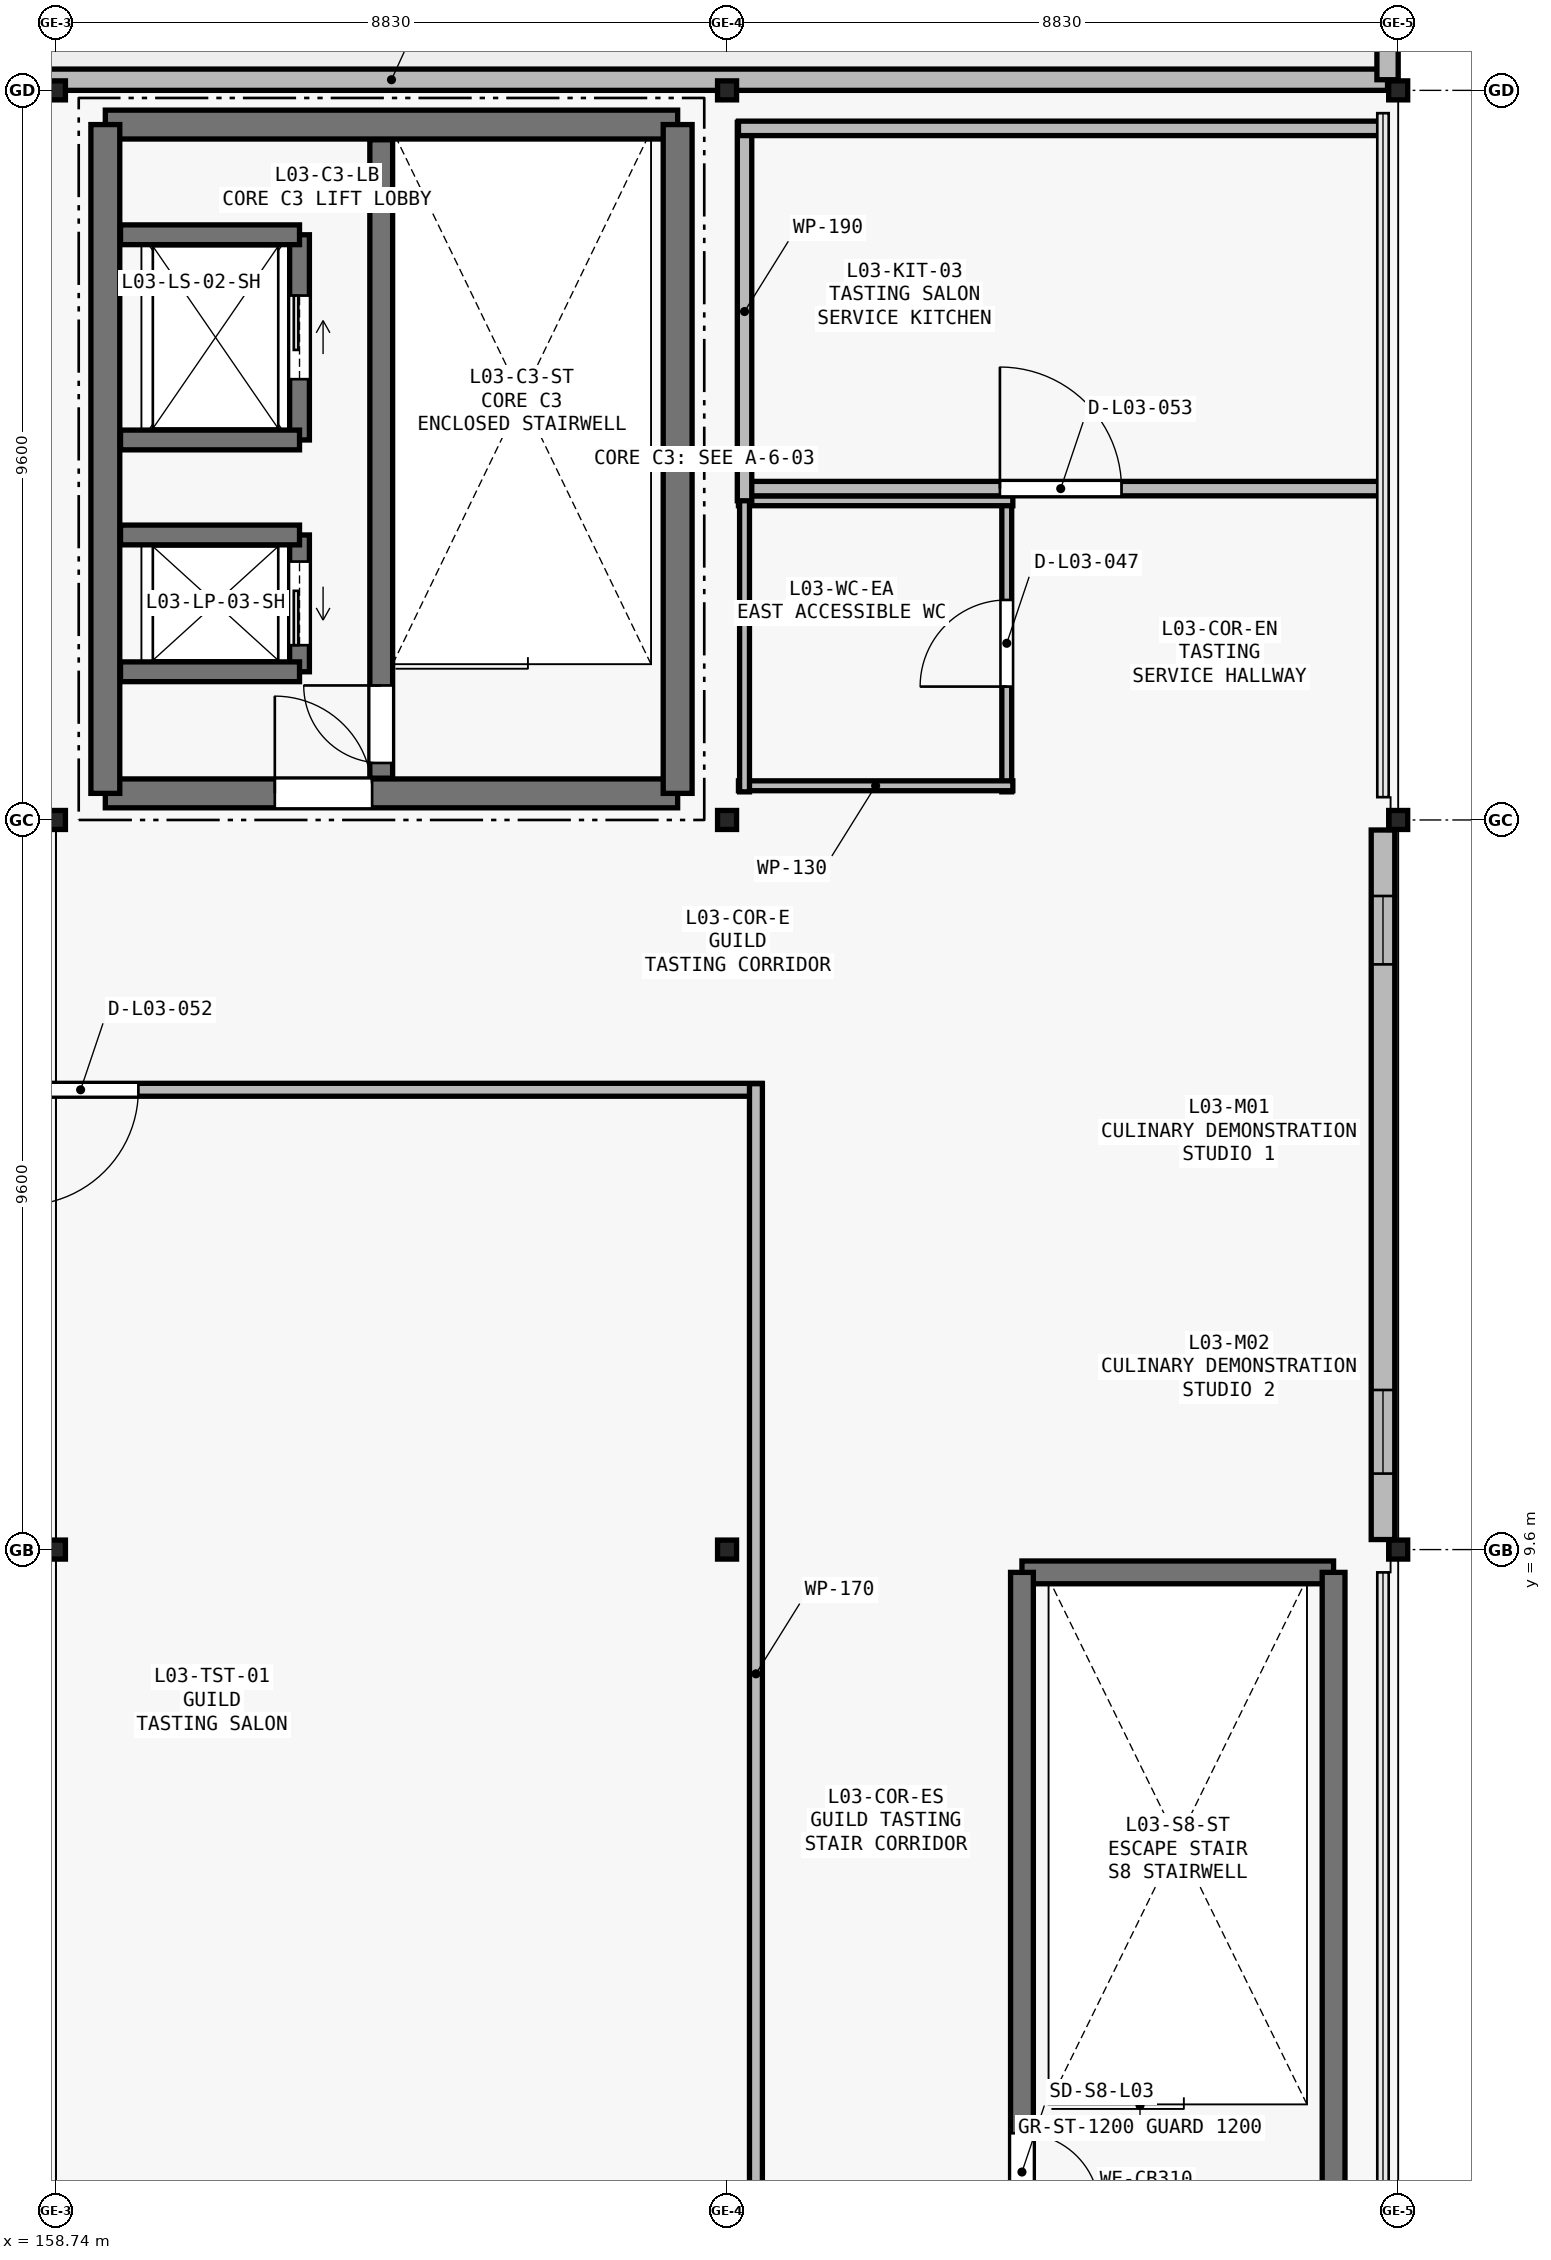
"""IFC4 building model, lengths in metres.
Left out: names, types, materials, properties, quantities, classifications, styles, units other than length and angle.
Written with IfcOpenShell. Run it as: python <this file> out.ifc"""

import sys

from ifc_helpers import new_model, si_unit, direction, frame, frame_2d, origin, origin_2d, place, context, subcontext, project, spatial, rectangle, i_section, extrude, element, fill, save


model = new_model("IFC4")
c1 = context("Model", 3, precision=1e-05, world=origin(), true_north=direction((0.0, 1.0)))
c2 = subcontext(c1, "Body", "Model", "MODEL_VIEW")
j1 = project(units=[si_unit("LENGTHUNIT", "METRE"), si_unit("PLANEANGLEUNIT", "RADIAN")], contexts=[c1])
p1 = place(None, origin())
s1 = spatial("IfcSite", under=j1, at=p1, CompositionType="ELEMENT")
p2 = place(p1, origin())
s2 = spatial("IfcBuilding", under=s1, at=p2, CompositionType="ELEMENT")
p3 = place(p2, frame((0.0, 0.0, 15.0)))
s3 = spatial("IfcBuildingStorey", under=s2, at=p3, CompositionType="ELEMENT", Elevation=15.0)
for number, where, z_axis, x_axis in (
    (1, (158.74, 9.6, 0.0), (0.0, 0.0, 1.0), (1.0, 0.0, 0.0)),
    (2, (158.74, 19.2, 0.0), (0.0, 0.0, 1.0), (1.0, 0.0, 0.0)),
    (3, (158.74, 28.8, 0.0), (0.0, 0.0, 1.0), (1.0, 0.0, 0.0)),
    (4, (167.57, 9.6, 0.0), (0.0, 0.0, 1.0), (1.0, 0.0, 0.0)),
    (5, (167.57, 19.2, 0.0), (0.0, 0.0, 1.0), (1.0, 0.0, 0.0)),
    (6, (167.57, 28.8, 0.0), (0.0, 0.0, 1.0), (1.0, 0.0, 0.0)),
    (7, (176.4, 9.6, 0.0), (0.0, 0.0, 1.0), (1.0, 0.0, 0.0)),
    (8, (176.4, 19.2, 0.0), (0.0, 0.0, 1.0), (1.0, 0.0, 0.0)),
    (9, (176.4, 28.8, 0.0), (0.0, 0.0, 1.0), (1.0, 0.0, 0.0)),
):
    element("IfcColumn", number, at=place(p3, frame(where, z_axis=z_axis, x_axis=x_axis)), inside=s3, PredefinedType="COLUMN", context=c2, shape_type="SweptSolid", body=[
        extrude(i_section(OverallWidth=0.25, OverallDepth=0.25, WebThickness=0.009, FlangeThickness=0.014, FilletRadius=0.016, at=origin_2d()), origin(), (0.0, 0.0, 1.0), 4.2),
    ])
p4 = place(p3, frame((176.2, 19.068, 0.0), z_axis=(0.0, 0.0, 1.0), x_axis=(0.0, -1.0, 0.0)))
e10 = element("IfcWall", 10, at=p4, inside=s3, PredefinedType="SOLIDWALL", context=c2, shape_type="SweptSolid", body=[
    extrude(rectangle(XDim=9.336, YDim=0.31, at=frame_2d((4.668, 0.0))), origin(), (0.0, 0.0, 1.0), 3.35),
])
p5 = place(p4, frame((0.868, 0.0, 0.95)))
e11 = element("IfcOpeningElement", 11, at=p5, cuts=e10, PredefinedType="OPENING", context=c2, shape_type="SweptSolid", body=[
    extrude(rectangle(XDim=0.9, YDim=2.1, at=frame_2d((0.45, 1.05))), frame((0.0, 0.165, 0.0), z_axis=(0.0, -1.0, 0.0), x_axis=(1.0, 0.0, 0.0)), (0.0, 0.0, 1.0), 0.33),
])
p6 = place(p4, frame((7.368, 0.0, 0.95)))
e12 = element("IfcOpeningElement", 12, at=p6, cuts=e10, PredefinedType="OPENING", context=c2, shape_type="SweptSolid", body=[
    extrude(rectangle(XDim=1.1, YDim=2.1, at=frame_2d((0.55, 1.05))), frame((0.0, 0.165, 0.0), z_axis=(0.0, -1.0, 0.0), x_axis=(1.0, 0.0, 0.0)), (0.0, 0.0, 1.0), 0.33),
])
p7 = place(p3, frame((150.05, 28.94, 0.01), z_axis=(0.0, 0.0, 1.0), x_axis=(1.0, 0.0, 0.0)))
e13 = element("IfcWall", 13, at=p7, inside=s3, PredefinedType="PARAPET", context=c2, shape_type="SweptSolid", body=[
    extrude(rectangle(XDim=26.21, YDim=0.28, at=frame_2d((13.105, 0.0))), origin(), (0.0, 0.0, 1.0), 1.15),
])
p8 = place(p3, frame((176.26, 28.94, 0.01), z_axis=(0.0, 0.0, 1.0), x_axis=(0.0, 1.0, 0.0)))
e14 = element("IfcWall", 14, at=p8, inside=s3, PredefinedType="PARAPET", context=c2, shape_type="SweptSolid", body=[
    extrude(rectangle(XDim=6.92, YDim=0.28, at=frame_2d((3.46, 0.0))), origin(), (0.0, 0.0, 1.0), 1.15),
])
p9 = place(p3, frame((159.39, 19.55, 0.0), z_axis=(0.0, 0.0, 1.0), x_axis=(1.0, 0.0, 0.0)))
e15 = element("IfcWall", 15, at=p9, inside=s3, PredefinedType="SHEAR", context=c2, shape_type="SweptSolid", body=[
    extrude(rectangle(XDim=7.53, YDim=0.38, at=frame_2d((3.765, 0.0))), origin(), (0.0, 0.0, 1.0), 4.2),
])
p10 = place(p9, frame((2.23, 0.0, 0.0)))
e16 = element("IfcOpeningElement", 16, at=p10, cuts=e15, PredefinedType="OPENING", context=c2, shape_type="SweptSolid", body=[
    extrude(rectangle(XDim=1.28, YDim=2.15, at=frame_2d((0.64, 1.075))), frame((0.0, 0.2, 0.0), z_axis=(0.0, -1.0, 0.0), x_axis=(1.0, 0.0, 0.0)), (0.0, 0.0, 1.0), 0.4),
])
p11 = place(p3, frame((166.92, 28.35, 0.0), z_axis=(0.0, 0.0, 1.0), x_axis=(-1.0, 0.0, 0.0)))
e17 = element("IfcWall", 17, at=p11, inside=s3, PredefinedType="SHEAR", context=c2, shape_type="SweptSolid", body=[
    extrude(rectangle(XDim=7.53, YDim=0.38, at=frame_2d((3.765, 0.0))), origin(), (0.0, 0.0, 1.0), 4.2),
])
for number, where, z_axis, x_axis in (
    (18, (159.39, 28.35, 0.0), (0.0, 0.0, 1.0), (0.0, -1.0, 0.0)),
    (19, (166.92, 19.55, 0.0), (0.0, 0.0, 1.0), (0.0, 1.0, 0.0)),
):
    element("IfcWall", number, at=place(p3, frame(where, z_axis=z_axis, x_axis=x_axis)), inside=s3, PredefinedType="SHEAR", context=c2, shape_type="SweptSolid", body=[
        extrude(rectangle(XDim=8.8, YDim=0.38, at=frame_2d((4.4, 0.0))), origin(), (0.0, 0.0, 1.0), 4.2),
    ])
p12 = place(p3, frame((163.02, 19.75, 0.0), z_axis=(0.0, 0.0, 1.0), x_axis=(0.0, 1.0, 0.0)))
e20 = element("IfcWall", 20, at=p12, inside=s3, PredefinedType="SHEAR", context=c2, shape_type="SweptSolid", body=[
    extrude(rectangle(XDim=8.4, YDim=0.3, at=frame_2d((4.2, 0.0))), origin(), (0.0, 0.0, 1.0), 4.2),
])
p13 = place(p12, frame((0.2, 0.0, 0.0)))
e21 = element("IfcOpeningElement", 21, at=p13, cuts=e20, PredefinedType="OPENING", context=c2, shape_type="SweptSolid", body=[
    extrude(rectangle(XDim=1.02, YDim=2.1, at=frame_2d((0.51, 1.05))), frame((0.0, 0.16, 0.0), z_axis=(0.0, -1.0, 0.0), x_axis=(1.0, 0.0, 0.0)), (0.0, 0.0, 1.0), 0.32),
])
p14 = place(p3, frame((161.945, 21.15, 0.0), z_axis=(0.0, 0.0, 1.0), x_axis=(0.0, 1.0, 0.0)))
e22 = element("IfcWall", 22, at=p14, inside=s3, PredefinedType="SHEAR", context=c2, shape_type="SweptSolid", body=[
    extrude(rectangle(XDim=1.8, YDim=0.26, at=frame_2d((0.9, 0.0))), origin(), (0.0, 0.0, 1.0), 4.2),
])
p15 = place(p14, frame((0.35, 0.0, 0.0)))
e23 = element("IfcOpeningElement", 23, at=p15, cuts=e22, PredefinedType="OPENING", context=c2, shape_type="SweptSolid", body=[
    extrude(rectangle(XDim=1.1, YDim=2.15, at=frame_2d((0.55, 1.075))), frame((0.0, 0.14, 0.0), z_axis=(0.0, -1.0, 0.0), x_axis=(1.0, 0.0, 0.0)), (0.0, 0.0, 1.0), 0.28),
])
for number, where, z_axis, x_axis in (
    (24, (159.59, 21.15, 0.0), (0.0, 0.0, 1.0), (1.0, 0.0, 0.0)),
    (25, (159.59, 22.95, 0.0), (0.0, 0.0, 1.0), (1.0, 0.0, 0.0)),
):
    element("IfcWall", number, at=place(p3, frame(where, z_axis=z_axis, x_axis=x_axis)), inside=s3, PredefinedType="SHEAR", context=c2, shape_type="SweptSolid", body=[
        extrude(rectangle(XDim=2.355, YDim=0.26, at=frame_2d((1.177, 0.0))), origin(), (0.0, 0.0, 1.0), 4.2),
    ])
p16 = place(p3, frame((161.945, 24.2, 0.0), z_axis=(0.0, 0.0, 1.0), x_axis=(0.0, 1.0, 0.0)))
e26 = element("IfcWall", 26, at=p16, inside=s3, PredefinedType="SHEAR", context=c2, shape_type="SweptSolid", body=[
    extrude(rectangle(XDim=2.7, YDim=0.26, at=frame_2d((1.35, 0.0))), origin(), (0.0, 0.0, 1.0), 4.2),
])
p17 = place(p16, frame((0.8, 0.0, 0.0)))
e27 = element("IfcOpeningElement", 27, at=p17, cuts=e26, PredefinedType="OPENING", context=c2, shape_type="SweptSolid", body=[
    extrude(rectangle(XDim=1.1, YDim=2.15, at=frame_2d((0.55, 1.075))), frame((0.0, 0.14, 0.0), z_axis=(0.0, -1.0, 0.0), x_axis=(1.0, 0.0, 0.0)), (0.0, 0.0, 1.0), 0.28),
])
for number, where, z_axis, x_axis in (
    (28, (159.59, 24.2, 0.0), (0.0, 0.0, 1.0), (1.0, 0.0, 0.0)),
    (29, (159.59, 26.9, 0.0), (0.0, 0.0, 1.0), (1.0, 0.0, 0.0)),
):
    element("IfcWall", number, at=place(p3, frame(where, z_axis=z_axis, x_axis=x_axis)), inside=s3, PredefinedType="SHEAR", context=c2, shape_type="SweptSolid", body=[
        extrude(rectangle(XDim=2.355, YDim=0.26, at=frame_2d((1.177, 0.0))), origin(), (0.0, 0.0, 1.0), 4.2),
    ])
p18 = place(p3, frame((175.55, 9.3, 0.0), z_axis=(0.0, 0.0, 1.0), x_axis=(-1.0, 0.0, 0.0)))
e30 = element("IfcWall", 30, at=p18, inside=s3, PredefinedType="SHEAR", context=c2, shape_type="SweptSolid", body=[
    extrude(rectangle(XDim=4.1, YDim=0.3, at=frame_2d((2.05, 0.0))), origin(), (0.0, 0.0, 1.0), 4.2),
])
p19 = place(p3, frame((171.45, 9.3, 0.0), z_axis=(0.0, 0.0, 1.0), x_axis=(0.0, -1.0, 0.0)))
e31 = element("IfcWall", 31, at=p19, inside=s3, PredefinedType="SHEAR", context=c2, shape_type="SweptSolid", body=[
    extrude(rectangle(XDim=8.7, YDim=0.3, at=frame_2d((4.35, 0.0))), origin(), (0.0, 0.0, 1.0), 4.2),
])
p20 = place(p19, frame((7.38, 0.0, 0.0)))
e32 = element("IfcOpeningElement", 32, at=p20, cuts=e31, PredefinedType="OPENING", context=c2, shape_type="SweptSolid", body=[
    extrude(rectangle(XDim=1.02, YDim=2.1, at=frame_2d((0.51, 1.05))), frame((0.0, 0.16, 0.0), z_axis=(0.0, -1.0, 0.0), x_axis=(1.0, 0.0, 0.0)), (0.0, 0.0, 1.0), 0.32),
])
p21 = place(p3, frame((175.55, 0.6, 0.0), z_axis=(0.0, 0.0, 1.0), x_axis=(0.0, 1.0, 0.0)))
e33 = element("IfcWall", 33, at=p21, inside=s3, PredefinedType="SHEAR", context=c2, shape_type="SweptSolid", body=[
    extrude(rectangle(XDim=8.7, YDim=0.3, at=frame_2d((4.35, 0.0))), origin(), (0.0, 0.0, 1.0), 4.2),
])
p22 = place(p3, frame((171.25, 19.57, 0.0), z_axis=(0.0, 0.0, 1.0), x_axis=(0.0, 1.0, 0.0)))
e34 = element("IfcWall", 34, at=p22, inside=s3, PredefinedType="PARTITIONING", context=c2, shape_type="SweptSolid", body=[
    extrude(rectangle(XDim=3.91, YDim=0.13, at=frame_2d((1.955, 0.0))), origin(), (0.0, 0.0, 1.0), 3.72),
])
p23 = place(p22, frame((1.385, 0.0, 0.0)))
e35 = element("IfcOpeningElement", 35, at=p23, cuts=e34, PredefinedType="OPENING", context=c2, shape_type="SweptSolid", body=[
    extrude(rectangle(XDim=1.14, YDim=2.22, at=frame_2d((0.57, 1.11))), frame((0.0, 0.075, 0.0), z_axis=(0.0, -1.0, 0.0), x_axis=(1.0, 0.0, 0.0)), (0.0, 0.0, 1.0), 0.15),
])
for number, where, z_axis, x_axis in (
    (36, (167.72, 19.65, 0.0), (0.0, 0.0, 1.0), (1.0, 0.0, 0.0)),
    (37, (171.33, 23.4, 0.0), (0.0, 0.0, 1.0), (-1.0, 0.0, 0.0)),
):
    element("IfcWall", number, at=place(p3, frame(where, z_axis=z_axis, x_axis=x_axis)), inside=s3, PredefinedType="PARTITIONING", context=c2, shape_type="SweptSolid", body=[
        extrude(rectangle(XDim=3.61, YDim=0.13, at=frame_2d((1.805, 0.0))), origin(), (0.0, 0.0, 1.0), 3.72),
    ])
p24 = place(p3, frame((167.8, 23.48, 0.0), z_axis=(0.0, 0.0, 1.0), x_axis=(0.0, -1.0, 0.0)))
e38 = element("IfcWall", 38, at=p24, inside=s3, PredefinedType="PARTITIONING", context=c2, shape_type="SweptSolid", body=[
    extrude(rectangle(XDim=3.91, YDim=0.13, at=frame_2d((1.955, 0.0))), origin(), (0.0, 0.0, 1.0), 3.72),
])
p25 = place(p3, frame((168.03, 15.65, 0.0), z_axis=(0.0, 0.0, 1.0), x_axis=(-1.0, 0.0, 0.0)))
e39 = element("IfcWall", 39, at=p25, inside=s3, PredefinedType="PARTITIONING", context=c2, shape_type="SweptSolid", body=[
    extrude(rectangle(XDim=17.93, YDim=0.17, at=frame_2d((8.965, 0.0))), origin(), (0.0, 0.0, 1.0), 3.72),
])
p26 = place(p25, frame((8.205, 0.0, 0.0)))
e40 = element("IfcOpeningElement", 40, at=p26, cuts=e39, PredefinedType="OPENING", context=c2, shape_type="SweptSolid", body=[
    extrude(rectangle(XDim=1.52, YDim=2.28, at=frame_2d((0.76, 1.14))), frame((0.0, 0.095, 0.0), z_axis=(0.0, -1.0, 0.0), x_axis=(1.0, 0.0, 0.0)), (0.0, 0.0, 1.0), 0.19),
])
p27 = place(p3, frame((167.95, 0.2, 0.0), z_axis=(0.0, 0.0, 1.0), x_axis=(0.0, 1.0, 0.0)))
e41 = element("IfcWall", 41, at=p27, inside=s3, PredefinedType="PARTITIONING", context=c2, shape_type="SweptSolid", body=[
    extrude(rectangle(XDim=15.53, YDim=0.17, at=frame_2d((7.765, 0.0))), origin(), (0.0, 0.0, 1.0), 3.72),
])
p28 = place(p3, frame((167.72, 23.56, 0.0), z_axis=(0.0, 0.0, 1.0), x_axis=(1.0, 0.0, 0.0)))
e42 = element("IfcWall", 42, at=p28, inside=s3, PredefinedType="PARTITIONING", context=c2, shape_type="SweptSolid", body=[
    extrude(rectangle(XDim=8.48, YDim=0.19, at=frame_2d((4.24, 0.0))), origin(), (0.0, 0.0, 1.0), 3.72),
])
p29 = place(p28, frame((3.44, 0.0, 0.0)))
e43 = element("IfcOpeningElement", 43, at=p29, cuts=e42, PredefinedType="OPENING", context=c2, shape_type="SweptSolid", body=[
    extrude(rectangle(XDim=1.6, YDim=2.2, at=frame_2d((0.8, 1.1))), frame((0.0, 0.105, 0.0), z_axis=(0.0, -1.0, 0.0), x_axis=(1.0, 0.0, 0.0)), (0.0, 0.0, 1.0), 0.21),
])
p30 = place(p3, frame((167.8, 28.38, 0.0), z_axis=(0.0, 0.0, 1.0), x_axis=(0.0, -1.0, 0.0)))
e44 = element("IfcWall", 44, at=p30, inside=s3, PredefinedType="PARTITIONING", context=c2, shape_type="SweptSolid", body=[
    extrude(rectangle(XDim=4.98, YDim=0.19, at=frame_2d((2.49, 0.0))), origin(), (0.0, 0.0, 1.0), 3.4),
])
p31 = place(p3, frame((176.2, 28.3, 0.0), z_axis=(0.0, 0.0, 1.0), x_axis=(-1.0, 0.0, 0.0)))
e45 = element("IfcWall", 45, at=p31, inside=s3, PredefinedType="PARTITIONING", context=c2, shape_type="SweptSolid", body=[
    extrude(rectangle(XDim=8.48, YDim=0.19, at=frame_2d((4.24, 0.0))), origin(), (0.0, 0.0, 1.0), 3.72),
])
p32 = place(p5, origin())
e46 = element("IfcWindow", 46, at=p32, inside=s3, PartitioningType="SINGLE_PANEL", PredefinedType="WINDOW", context=c2, shape_type="SweptSolid", body=[
    extrude(rectangle(XDim=0.9, YDim=2.1, at=frame_2d((0.45, 1.05))), frame((0.0, 0.03, 0.0), z_axis=(0.0, -1.0, 0.0), x_axis=(1.0, 0.0, 0.0)), (0.0, 0.0, 1.0), 0.06),
])
fill(e11, e46)
p33 = place(p6, origin())
e47 = element("IfcWindow", 47, at=p33, inside=s3, PartitioningType="SINGLE_PANEL", PredefinedType="WINDOW", context=c2, shape_type="SweptSolid", body=[
    extrude(rectangle(XDim=1.1, YDim=2.1, at=frame_2d((0.55, 1.05))), frame((0.0, 0.03, 0.0), z_axis=(0.0, -1.0, 0.0), x_axis=(1.0, 0.0, 0.0)), (0.0, 0.0, 1.0), 0.06),
])
fill(e12, e47)
p34 = place(p10, origin())
e48 = element("IfcDoor", 48, at=p34, inside=s3, OperationType="SINGLE_SWING_LEFT", PredefinedType="DOOR", context=c2, shape_type="SweptSolid", body=[
    extrude(rectangle(XDim=1.28, YDim=2.15, at=frame_2d((0.64, 1.075))), frame((0.0, 0.025, 0.0), z_axis=(0.0, -1.0, 0.0), x_axis=(1.0, 0.0, 0.0)), (0.0, 0.0, 1.0), 0.05),
])
fill(e16, e48)
p35 = place(p13, origin())
e49 = element("IfcDoor", 49, at=p35, inside=s3, OperationType="SINGLE_SWING_RIGHT", PredefinedType="DOOR", context=c2, shape_type="SweptSolid", body=[
    extrude(rectangle(XDim=1.02, YDim=2.1, at=frame_2d((0.51, 1.05))), frame((0.0, 0.025, 0.0), z_axis=(0.0, -1.0, 0.0), x_axis=(1.0, 0.0, 0.0)), (0.0, 0.0, 1.0), 0.05),
])
fill(e21, e49)
p36 = place(p15, origin())
e50 = element("IfcDoor", 50, at=p36, inside=s3, OperationType="SLIDING_TO_LEFT", PredefinedType="DOOR", context=c2, shape_type="SweptSolid", body=[
    extrude(rectangle(XDim=1.1, YDim=2.15, at=frame_2d((0.55, 1.075))), frame((0.0, 0.025, 0.0), z_axis=(0.0, -1.0, 0.0), x_axis=(1.0, 0.0, 0.0)), (0.0, 0.0, 1.0), 0.05),
])
fill(e23, e50)
p37 = place(p17, origin())
e51 = element("IfcDoor", 51, at=p37, inside=s3, OperationType="SLIDING_TO_RIGHT", PredefinedType="DOOR", context=c2, shape_type="SweptSolid", body=[
    extrude(rectangle(XDim=1.1, YDim=2.15, at=frame_2d((0.55, 1.075))), frame((0.0, 0.025, 0.0), z_axis=(0.0, -1.0, 0.0), x_axis=(1.0, 0.0, 0.0)), (0.0, 0.0, 1.0), 0.05),
])
fill(e27, e51)
p38 = place(p20, origin())
e52 = element("IfcDoor", 52, at=p38, inside=s3, OperationType="SINGLE_SWING_RIGHT", PredefinedType="DOOR", context=c2, shape_type="SweptSolid", body=[
    extrude(rectangle(XDim=1.02, YDim=2.1, at=frame_2d((0.51, 1.05))), frame((0.0, 0.025, 0.0), z_axis=(0.0, -1.0, 0.0), x_axis=(1.0, 0.0, 0.0)), (0.0, 0.0, 1.0), 0.05),
])
fill(e32, e52)
p39 = place(p23, origin())
e53 = element("IfcDoor", 53, at=p39, inside=s3, OperationType="SINGLE_SWING_LEFT", PredefinedType="DOOR", context=c2, shape_type="SweptSolid", body=[
    extrude(rectangle(XDim=1.14, YDim=2.22, at=frame_2d((0.57, 1.11))), frame((0.0, 0.025, 0.0), z_axis=(0.0, -1.0, 0.0), x_axis=(1.0, 0.0, 0.0)), (0.0, 0.0, 1.0), 0.05),
])
fill(e35, e53)
p40 = place(p26, origin())
e54 = element("IfcDoor", 54, at=p40, inside=s3, OperationType="SINGLE_SWING_RIGHT", PredefinedType="DOOR", context=c2, shape_type="SweptSolid", body=[
    extrude(rectangle(XDim=1.52, YDim=2.28, at=frame_2d((0.76, 1.14))), frame((0.0, 0.025, 0.0), z_axis=(0.0, -1.0, 0.0), x_axis=(1.0, 0.0, 0.0)), (0.0, 0.0, 1.0), 0.05),
])
fill(e40, e54)
p41 = place(p29, origin())
e55 = element("IfcDoor", 55, at=p41, inside=s3, OperationType="SINGLE_SWING_LEFT", PredefinedType="DOOR", context=c2, shape_type="SweptSolid", body=[
    extrude(rectangle(XDim=1.6, YDim=2.2, at=frame_2d((0.8, 1.1))), frame((0.0, 0.025, 0.0), z_axis=(0.0, -1.0, 0.0), x_axis=(1.0, 0.0, 0.0)), (0.0, 0.0, 1.0), 0.05),
])
fill(e43, e55)
save(model, sys.argv[1])
